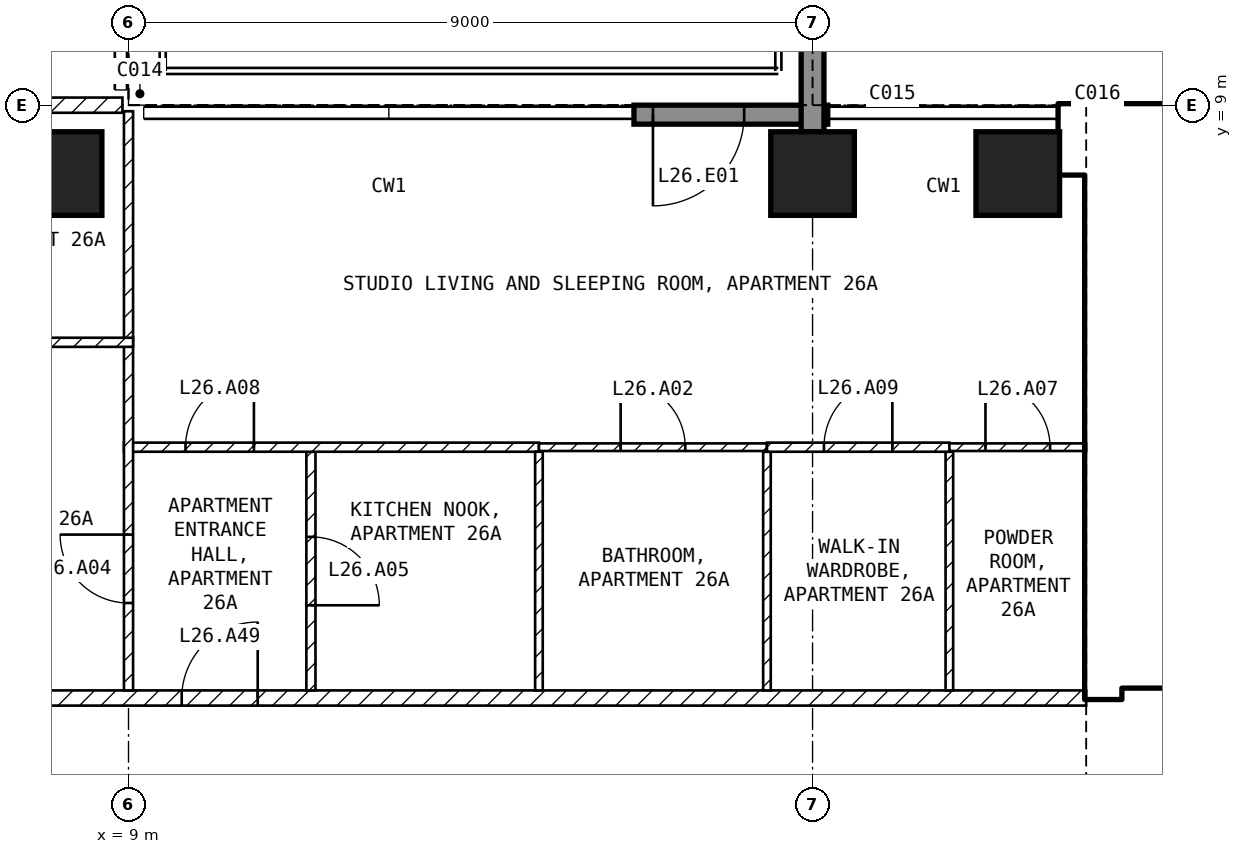
"""IFC4 building model, lengths in metres.
Left out: names, types, materials, properties, quantities, classifications, styles, units other than length and angle.
Written with IfcOpenShell. Run it as: python <this file> out.ifc"""

import sys

from ifc_helpers import new_model, si_unit, direction, frame, frame_2d, origin, origin_2d, place, context, subcontext, project, spatial, rectangle, extrude, element, fill, save


model = new_model("IFC4")
c1 = context("Model", 3, precision=1e-05, world=origin(), true_north=direction((0.0, 1.0)))
c2 = subcontext(c1, "Body", "Model", "MODEL_VIEW")
j1 = project(units=[si_unit("LENGTHUNIT", "METRE"), si_unit("PLANEANGLEUNIT", "RADIAN")], contexts=[c1])
p1 = place(None, origin())
s1 = spatial("IfcSite", under=j1, at=p1, CompositionType="ELEMENT")
p2 = place(p1, origin())
s2 = spatial("IfcBuilding", under=s1, at=p2, CompositionType="ELEMENT")
p3 = place(p2, frame((0.0, 0.0, 112.9)))
s3 = spatial("IfcBuildingStorey", under=s2, at=p3, CompositionType="ELEMENT", Elevation=112.9)
for number, where, z_axis, x_axis in (
    (1, (8.1, 8.1, -0.25), (0.0, 0.0, 1.0), (1.0, 0.0, 0.0)),
    (2, (18.0, 8.1, -0.25), (0.0, 0.0, 1.0), (1.0, 0.0, 0.0)),
    (3, (20.7, 8.1, -0.25), (0.0, 0.0, 1.0), (1.0, 0.0, 0.0)),
):
    element("IfcColumn", number, at=place(p3, frame(where, z_axis=z_axis, x_axis=x_axis)), inside=s3, PredefinedType="COLUMN", context=c2, shape_type="SweptSolid", body=[
        extrude(rectangle(XDim=1.1, YDim=1.1, at=origin_2d()), origin(), (0.0, 0.0, 1.0), 3.5),
    ])
p4 = place(p3, frame((18.2, 8.875, 0.0), z_axis=(0.0, 0.0, 1.0), x_axis=(-1.0, 0.0, 0.0)))
e4 = element("IfcWall", 4, at=p4, inside=s3, PredefinedType="SOLIDWALL", context=c2, shape_type="SweptSolid", body=[
    extrude(rectangle(XDim=2.55, YDim=0.25, at=frame_2d((1.275, 0.0))), origin(), (0.0, 0.0, 1.0), 3.25),
])
p5 = place(p4, frame((1.1, 0.0, 0.0)))
e5 = element("IfcOpeningElement", 5, at=p5, cuts=e4, PredefinedType="OPENING", context=c2, shape_type="SweptSolid", body=[
    extrude(rectangle(XDim=1.2, YDim=2.4, at=frame_2d((0.6, 1.2))), frame((0.0, 0.135, 0.0), z_axis=(0.0, -1.0, 0.0), x_axis=(1.0, 0.0, 0.0)), (0.0, 0.0, 1.0), 0.27),
])
p6 = place(p3, frame((18.0, 8.65, 0.0), z_axis=(0.0, 0.0, 1.0), x_axis=(0.0, 1.0, 0.0)))
e6 = element("IfcWall", 6, at=p6, inside=s3, PredefinedType="SOLIDWALL", context=c2, shape_type="SweptSolid", body=[
    extrude(rectangle(XDim=3.09, YDim=0.3, at=frame_2d((1.545, 0.0))), origin(), (0.0, 0.0, 1.0), 3.25),
])
p7 = place(p3, frame((21.25, 8.55, 0.0), z_axis=(0.0, 0.0, 1.0), x_axis=(1.0, 0.0, 0.0)))
e7 = element("IfcWall", 7, at=p7, inside=s3, PredefinedType="SHEAR", context=c2, shape_type="SweptSolid", body=[
    extrude(rectangle(XDim=8.2, YDim=0.9, at=frame_2d((4.1, 0.0))), origin(), (0.0, 0.0, 1.0), 3.25),
])
p8 = place(p3, frame((21.825, 1.2, 0.0), z_axis=(0.0, 0.0, 1.0), x_axis=(0.0, 1.0, 0.0)))
e8 = element("IfcWall", 8, at=p8, inside=s3, PredefinedType="SHEAR", context=c2, shape_type="SweptSolid", body=[
    extrude(rectangle(XDim=6.9, YDim=0.45, at=frame_2d((3.45, 0.0))), origin(), (0.0, 0.0, 1.0), 3.25),
])
p9 = place(p3, frame((22.05, 1.45, 0.0), z_axis=(0.0, 0.0, 1.0), x_axis=(1.0, 0.0, 0.0)))
e9 = element("IfcWall", 9, at=p9, inside=s3, PredefinedType="SOLIDWALL", context=c2, shape_type="SweptSolid", body=[
    extrude(rectangle(XDim=11.0, YDim=0.2, at=frame_2d((5.5, 0.0))), origin(), (0.0, 0.0, 1.0), 3.25),
])
p10 = place(p9, frame((0.75, 0.0, 0.0)))
e10 = element("IfcOpeningElement", 10, at=p10, cuts=e9, PredefinedType="OPENING", context=c2, shape_type="SweptSolid", body=[
    extrude(rectangle(XDim=1.0, YDim=2.1, at=frame_2d((0.5, 1.05))), frame((0.0, 0.11, 0.0), z_axis=(0.0, -1.0, 0.0), x_axis=(1.0, 0.0, 0.0)), (0.0, 0.0, 1.0), 0.22),
])
p11 = place(p9, frame((3.25, 0.0, 0.0)))
e11 = element("IfcOpeningElement", 11, at=p11, cuts=e9, PredefinedType="OPENING", context=c2, shape_type="SweptSolid", body=[
    extrude(rectangle(XDim=1.0, YDim=2.1, at=frame_2d((0.5, 1.05))), frame((0.0, 0.11, 0.0), z_axis=(0.0, -1.0, 0.0), x_axis=(1.0, 0.0, 0.0)), (0.0, 0.0, 1.0), 0.22),
])
p12 = place(p9, frame((9.075, 0.0, 0.0)))
e12 = element("IfcOpeningElement", 12, at=p12, cuts=e9, PredefinedType="OPENING", context=c2, shape_type="SweptSolid", body=[
    extrude(rectangle(XDim=0.9, YDim=2.1, at=frame_2d((0.45, 1.05))), frame((0.0, 0.11, 0.0), z_axis=(0.0, -1.0, 0.0), x_axis=(1.0, 0.0, 0.0)), (0.0, 0.0, 1.0), 0.22),
])
p13 = place(p3, frame((22.05, 5.15, 0.0), z_axis=(0.0, 0.0, 1.0), x_axis=(1.0, 0.0, 0.0)))
e13 = element("IfcWall", 13, at=p13, inside=s3, PredefinedType="SOLIDWALL", context=c2, shape_type="SweptSolid", body=[
    extrude(rectangle(XDim=6.3, YDim=0.2, at=frame_2d((3.15, 0.0))), origin(), (0.0, 0.0, 1.0), 3.25),
])
p14 = place(p13, frame((0.2, 0.0, 0.0)))
e14 = element("IfcOpeningElement", 14, at=p14, cuts=e13, PredefinedType="OPENING", context=c2, shape_type="SweptSolid", body=[
    extrude(rectangle(XDim=1.0, YDim=2.1, at=frame_2d((0.5, 1.05))), frame((0.0, 0.11, 0.0), z_axis=(0.0, -1.0, 0.0), x_axis=(1.0, 0.0, 0.0)), (0.0, 0.0, 1.0), 0.22),
])
p15 = place(p3, frame((4.4, 1.2, 0.0), z_axis=(0.0, 0.0, 1.0), x_axis=(1.0, 0.0, 0.0)))
e15 = element("IfcWall", 15, at=p15, inside=s3, PredefinedType="PARTITIONING", context=c2, shape_type="SweptSolid", body=[
    extrude(rectangle(XDim=17.2, YDim=0.2, at=frame_2d((8.6, 0.0))), origin(), (0.0, 0.0, 1.0), 3.25),
])
p16 = place(p15, frame((5.3, 0.0, 0.0)))
e16 = element("IfcOpeningElement", 16, at=p16, cuts=e15, PredefinedType="OPENING", context=c2, shape_type="SweptSolid", body=[
    extrude(rectangle(XDim=1.0, YDim=2.1, at=frame_2d((0.5, 1.05))), frame((0.0, 0.11, 0.0), z_axis=(0.0, -1.0, 0.0), x_axis=(1.0, 0.0, 0.0)), (0.0, 0.0, 1.0), 0.22),
])
p17 = place(p3, frame((-8.92, 9.0, 0.0), z_axis=(0.0, 0.0, 1.0), x_axis=(1.0, 0.0, 0.0)))
e17 = element("IfcWall", 17, at=p17, inside=s3, PredefinedType="PARTITIONING", context=c2, shape_type="SweptSolid", body=[
    extrude(rectangle(XDim=17.84, YDim=0.2, at=frame_2d((8.92, 0.0))), origin(), (0.0, 0.0, 1.0), 3.25),
])
p18 = place(p17, frame((8.42, 0.0, 0.0)))
e18 = element("IfcOpeningElement", 18, at=p18, cuts=e17, PredefinedType="OPENING", context=c2, shape_type="SweptSolid", body=[
    extrude(rectangle(XDim=1.0, YDim=2.1, at=frame_2d((0.5, 1.05))), frame((0.0, 0.11, 0.0), z_axis=(0.0, -1.0, 0.0), x_axis=(1.0, 0.0, 0.0)), (0.0, 0.0, 1.0), 0.22),
])
p19 = place(p3, frame((11.4, 4.44, 0.0), z_axis=(0.0, 0.0, 1.0), x_axis=(0.0, -1.0, 0.0)))
e19 = element("IfcWall", 19, at=p19, inside=s3, PredefinedType="PARTITIONING", context=c2, shape_type="SweptSolid", body=[
    extrude(rectangle(XDim=3.14, YDim=0.12, at=frame_2d((1.57, 0.0))), origin(), (0.0, 0.0, 1.0), 3.25),
])
p20 = place(p19, frame((1.12, 0.0, 0.0)))
e20 = element("IfcOpeningElement", 20, at=p20, cuts=e19, PredefinedType="OPENING", context=c2, shape_type="SweptSolid", body=[
    extrude(rectangle(XDim=0.9, YDim=2.1, at=frame_2d((0.45, 1.05))), frame((0.0, 0.07, 0.0), z_axis=(0.0, -1.0, 0.0), x_axis=(1.0, 0.0, 0.0)), (0.0, 0.0, 1.0), 0.14),
])
p21 = place(p3, frame((8.94, 4.5, 0.0), z_axis=(0.0, 0.0, 1.0), x_axis=(1.0, 0.0, 0.0)))
e21 = element("IfcWall", 21, at=p21, inside=s3, PredefinedType="PARTITIONING", context=c2, shape_type="SweptSolid", body=[
    extrude(rectangle(XDim=5.46, YDim=0.12, at=frame_2d((2.73, 0.0))), origin(), (0.0, 0.0, 1.0), 3.25),
])
p22 = place(p21, frame((0.81, 0.0, 0.0)))
e22 = element("IfcOpeningElement", 22, at=p22, cuts=e21, PredefinedType="OPENING", context=c2, shape_type="SweptSolid", body=[
    extrude(rectangle(XDim=0.9, YDim=2.1, at=frame_2d((0.45, 1.05))), frame((0.0, 0.07, 0.0), z_axis=(0.0, -1.0, 0.0), x_axis=(1.0, 0.0, 0.0)), (0.0, 0.0, 1.0), 0.14),
])
p23 = place(p3, frame((9.0, 1.3, 0.0), z_axis=(0.0, 0.0, 1.0), x_axis=(0.0, 1.0, 0.0)))
e23 = element("IfcWall", 23, at=p23, inside=s3, PredefinedType="PARTITIONING", context=c2, shape_type="SweptSolid", body=[
    extrude(rectangle(XDim=7.62, YDim=0.12, at=frame_2d((3.81, 0.0))), origin(), (0.0, 0.0, 1.0), 3.25),
])
p24 = place(p23, frame((1.15, 0.0, 0.0)))
e24 = element("IfcOpeningElement", 24, at=p24, cuts=e23, PredefinedType="OPENING", context=c2, shape_type="SweptSolid", body=[
    extrude(rectangle(XDim=0.9, YDim=2.1, at=frame_2d((0.45, 1.05))), frame((0.0, 0.07, 0.0), z_axis=(0.0, -1.0, 0.0), x_axis=(1.0, 0.0, 0.0)), (0.0, 0.0, 1.0), 0.14),
])
for number, where, z_axis, x_axis in (
    (25, (14.4, 4.44, 0.0), (0.0, 0.0, 1.0), (0.0, -1.0, 0.0)),
    (26, (17.4, 4.44, 0.0), (0.0, 0.0, 1.0), (0.0, -1.0, 0.0)),
):
    element("IfcWall", number, at=place(p3, frame(where, z_axis=z_axis, x_axis=x_axis)), inside=s3, PredefinedType="PARTITIONING", context=c2, shape_type="SweptSolid", body=[
        extrude(rectangle(XDim=3.14, YDim=0.1, at=frame_2d((1.57, 0.0))), origin(), (0.0, 0.0, 1.0), 3.25),
    ])
p25 = place(p3, frame((14.4, 4.5, 0.0), z_axis=(0.0, 0.0, 1.0), x_axis=(1.0, 0.0, 0.0)))
e27 = element("IfcWall", 27, at=p25, inside=s3, PredefinedType="PARTITIONING", context=c2, shape_type="SweptSolid", body=[
    extrude(rectangle(XDim=3.0, YDim=0.1, at=frame_2d((1.5, 0.0))), origin(), (0.0, 0.0, 1.0), 3.25),
])
p26 = place(p25, frame((1.075, 0.0, 0.0)))
e28 = element("IfcOpeningElement", 28, at=p26, cuts=e27, PredefinedType="OPENING", context=c2, shape_type="SweptSolid", body=[
    extrude(rectangle(XDim=0.85, YDim=2.1, at=frame_2d((0.425, 1.05))), frame((0.0, 0.06, 0.0), z_axis=(0.0, -1.0, 0.0), x_axis=(1.0, 0.0, 0.0)), (0.0, 0.0, 1.0), 0.12),
])
p27 = place(p3, frame((19.8, 4.44, 0.0), z_axis=(0.0, 0.0, 1.0), x_axis=(0.0, -1.0, 0.0)))
e29 = element("IfcWall", 29, at=p27, inside=s3, PredefinedType="PARTITIONING", context=c2, shape_type="SweptSolid", body=[
    extrude(rectangle(XDim=3.14, YDim=0.1, at=frame_2d((1.57, 0.0))), origin(), (0.0, 0.0, 1.0), 3.25),
])
p28 = place(p3, frame((17.4, 4.5, 0.0), z_axis=(0.0, 0.0, 1.0), x_axis=(1.0, 0.0, 0.0)))
e30 = element("IfcWall", 30, at=p28, inside=s3, PredefinedType="PARTITIONING", context=c2, shape_type="SweptSolid", body=[
    extrude(rectangle(XDim=2.4, YDim=0.12, at=frame_2d((1.2, 0.0))), origin(), (0.0, 0.0, 1.0), 3.25),
])
p29 = place(p28, frame((0.75, 0.0, 0.0)))
e31 = element("IfcOpeningElement", 31, at=p29, cuts=e30, PredefinedType="OPENING", context=c2, shape_type="SweptSolid", body=[
    extrude(rectangle(XDim=0.9, YDim=2.1, at=frame_2d((0.45, 1.05))), frame((0.0, 0.07, 0.0), z_axis=(0.0, -1.0, 0.0), x_axis=(1.0, 0.0, 0.0)), (0.0, 0.0, 1.0), 0.14),
])
p30 = place(p3, frame((19.8, 4.5, 0.0), z_axis=(0.0, 0.0, 1.0), x_axis=(1.0, 0.0, 0.0)))
e32 = element("IfcWall", 32, at=p30, inside=s3, PredefinedType="PARTITIONING", context=c2, shape_type="SweptSolid", body=[
    extrude(rectangle(XDim=1.8, YDim=0.1, at=frame_2d((0.9, 0.0))), origin(), (0.0, 0.0, 1.0), 3.25),
])
p31 = place(p30, frame((0.475, 0.0, 0.0)))
e33 = element("IfcOpeningElement", 33, at=p31, cuts=e32, PredefinedType="OPENING", context=c2, shape_type="SweptSolid", body=[
    extrude(rectangle(XDim=0.85, YDim=2.1, at=frame_2d((0.425, 1.05))), frame((0.0, 0.06, 0.0), z_axis=(0.0, -1.0, 0.0), x_axis=(1.0, 0.0, 0.0)), (0.0, 0.0, 1.0), 0.12),
])
p32 = place(p3, frame((4.44, 5.88, 0.0), z_axis=(0.0, 0.0, 1.0), x_axis=(1.0, 0.0, 0.0)))
e34 = element("IfcWall", 34, at=p32, inside=s3, PredefinedType="PARTITIONING", context=c2, shape_type="SweptSolid", body=[
    extrude(rectangle(XDim=4.62, YDim=0.12, at=frame_2d((2.31, 0.0))), origin(), (0.0, 0.0, 1.0), 3.25),
])
p33 = place(p32, frame((1.86, 0.0, 0.0)))
e35 = element("IfcOpeningElement", 35, at=p33, cuts=e34, PredefinedType="OPENING", context=c2, shape_type="SweptSolid", body=[
    extrude(rectangle(XDim=0.9, YDim=2.1, at=frame_2d((0.45, 1.05))), frame((0.0, 0.07, 0.0), z_axis=(0.0, -1.0, 0.0), x_axis=(1.0, 0.0, 0.0)), (0.0, 0.0, 1.0), 0.14),
])
p34 = place(p5, origin())
e36 = element("IfcDoor", 36, at=p34, inside=s3, OperationType="SINGLE_SWING_RIGHT", PredefinedType="DOOR", context=c2, shape_type="SweptSolid", body=[
    extrude(rectangle(XDim=1.2, YDim=2.4, at=frame_2d((0.6, 1.2))), frame((0.0, 0.025, 0.0), z_axis=(0.0, -1.0, 0.0), x_axis=(1.0, 0.0, 0.0)), (0.0, 0.0, 1.0), 0.05),
])
fill(e5, e36)
p35 = place(p14, origin())
e37 = element("IfcDoor", 37, at=p35, inside=s3, OperationType="SINGLE_SWING_LEFT", PredefinedType="DOOR", context=c2, shape_type="SweptSolid", body=[
    extrude(rectangle(XDim=1.0, YDim=2.1, at=frame_2d((0.5, 1.05))), frame((0.0, 0.025, 0.0), z_axis=(0.0, -1.0, 0.0), x_axis=(1.0, 0.0, 0.0)), (0.0, 0.0, 1.0), 0.05),
])
fill(e14, e37)
p36 = place(p26, origin())
e38 = element("IfcDoor", 38, at=p36, inside=s3, OperationType="SINGLE_SWING_LEFT", PredefinedType="DOOR", context=c2, shape_type="SweptSolid", body=[
    extrude(rectangle(XDim=0.85, YDim=2.1, at=frame_2d((0.425, 1.05))), frame((0.0, 0.025, 0.0), z_axis=(0.0, -1.0, 0.0), x_axis=(1.0, 0.0, 0.0)), (0.0, 0.0, 1.0), 0.05),
])
fill(e28, e38)
p37 = place(p24, origin())
e39 = element("IfcDoor", 39, at=p37, inside=s3, OperationType="SINGLE_SWING_RIGHT", PredefinedType="DOOR", context=c2, shape_type="SweptSolid", body=[
    extrude(rectangle(XDim=0.9, YDim=2.1, at=frame_2d((0.45, 1.05))), frame((0.0, 0.025, 0.0), z_axis=(0.0, -1.0, 0.0), x_axis=(1.0, 0.0, 0.0)), (0.0, 0.0, 1.0), 0.05),
])
fill(e24, e39)
p38 = place(p20, origin())
e40 = element("IfcDoor", 40, at=p38, inside=s3, OperationType="SINGLE_SWING_RIGHT", PredefinedType="DOOR", context=c2, shape_type="SweptSolid", body=[
    extrude(rectangle(XDim=0.9, YDim=2.1, at=frame_2d((0.45, 1.05))), frame((0.0, 0.025, 0.0), z_axis=(0.0, -1.0, 0.0), x_axis=(1.0, 0.0, 0.0)), (0.0, 0.0, 1.0), 0.05),
])
fill(e20, e40)
p39 = place(p31, origin())
e41 = element("IfcDoor", 41, at=p39, inside=s3, OperationType="SINGLE_SWING_LEFT", PredefinedType="DOOR", context=c2, shape_type="SweptSolid", body=[
    extrude(rectangle(XDim=0.85, YDim=2.1, at=frame_2d((0.425, 1.05))), frame((0.0, 0.025, 0.0), z_axis=(0.0, -1.0, 0.0), x_axis=(1.0, 0.0, 0.0)), (0.0, 0.0, 1.0), 0.05),
])
fill(e33, e41)
p40 = place(p22, origin())
e42 = element("IfcDoor", 42, at=p40, inside=s3, OperationType="SINGLE_SWING_RIGHT", PredefinedType="DOOR", context=c2, shape_type="SweptSolid", body=[
    extrude(rectangle(XDim=0.9, YDim=2.1, at=frame_2d((0.45, 1.05))), frame((0.0, 0.025, 0.0), z_axis=(0.0, -1.0, 0.0), x_axis=(1.0, 0.0, 0.0)), (0.0, 0.0, 1.0), 0.05),
])
fill(e22, e42)
p41 = place(p29, origin())
e43 = element("IfcDoor", 43, at=p41, inside=s3, OperationType="SINGLE_SWING_RIGHT", PredefinedType="DOOR", context=c2, shape_type="SweptSolid", body=[
    extrude(rectangle(XDim=0.9, YDim=2.1, at=frame_2d((0.45, 1.05))), frame((0.0, 0.025, 0.0), z_axis=(0.0, -1.0, 0.0), x_axis=(1.0, 0.0, 0.0)), (0.0, 0.0, 1.0), 0.05),
])
fill(e31, e43)
p42 = place(p16, origin())
e44 = element("IfcDoor", 44, at=p42, inside=s3, OperationType="SINGLE_SWING_RIGHT", PredefinedType="DOOR", context=c2, shape_type="SweptSolid", body=[
    extrude(rectangle(XDim=1.0, YDim=2.1, at=frame_2d((0.5, 1.05))), frame((0.0, 0.025, 0.0), z_axis=(0.0, -1.0, 0.0), x_axis=(1.0, 0.0, 0.0)), (0.0, 0.0, 1.0), 0.05),
])
fill(e16, e44)
save(model, sys.argv[1])
